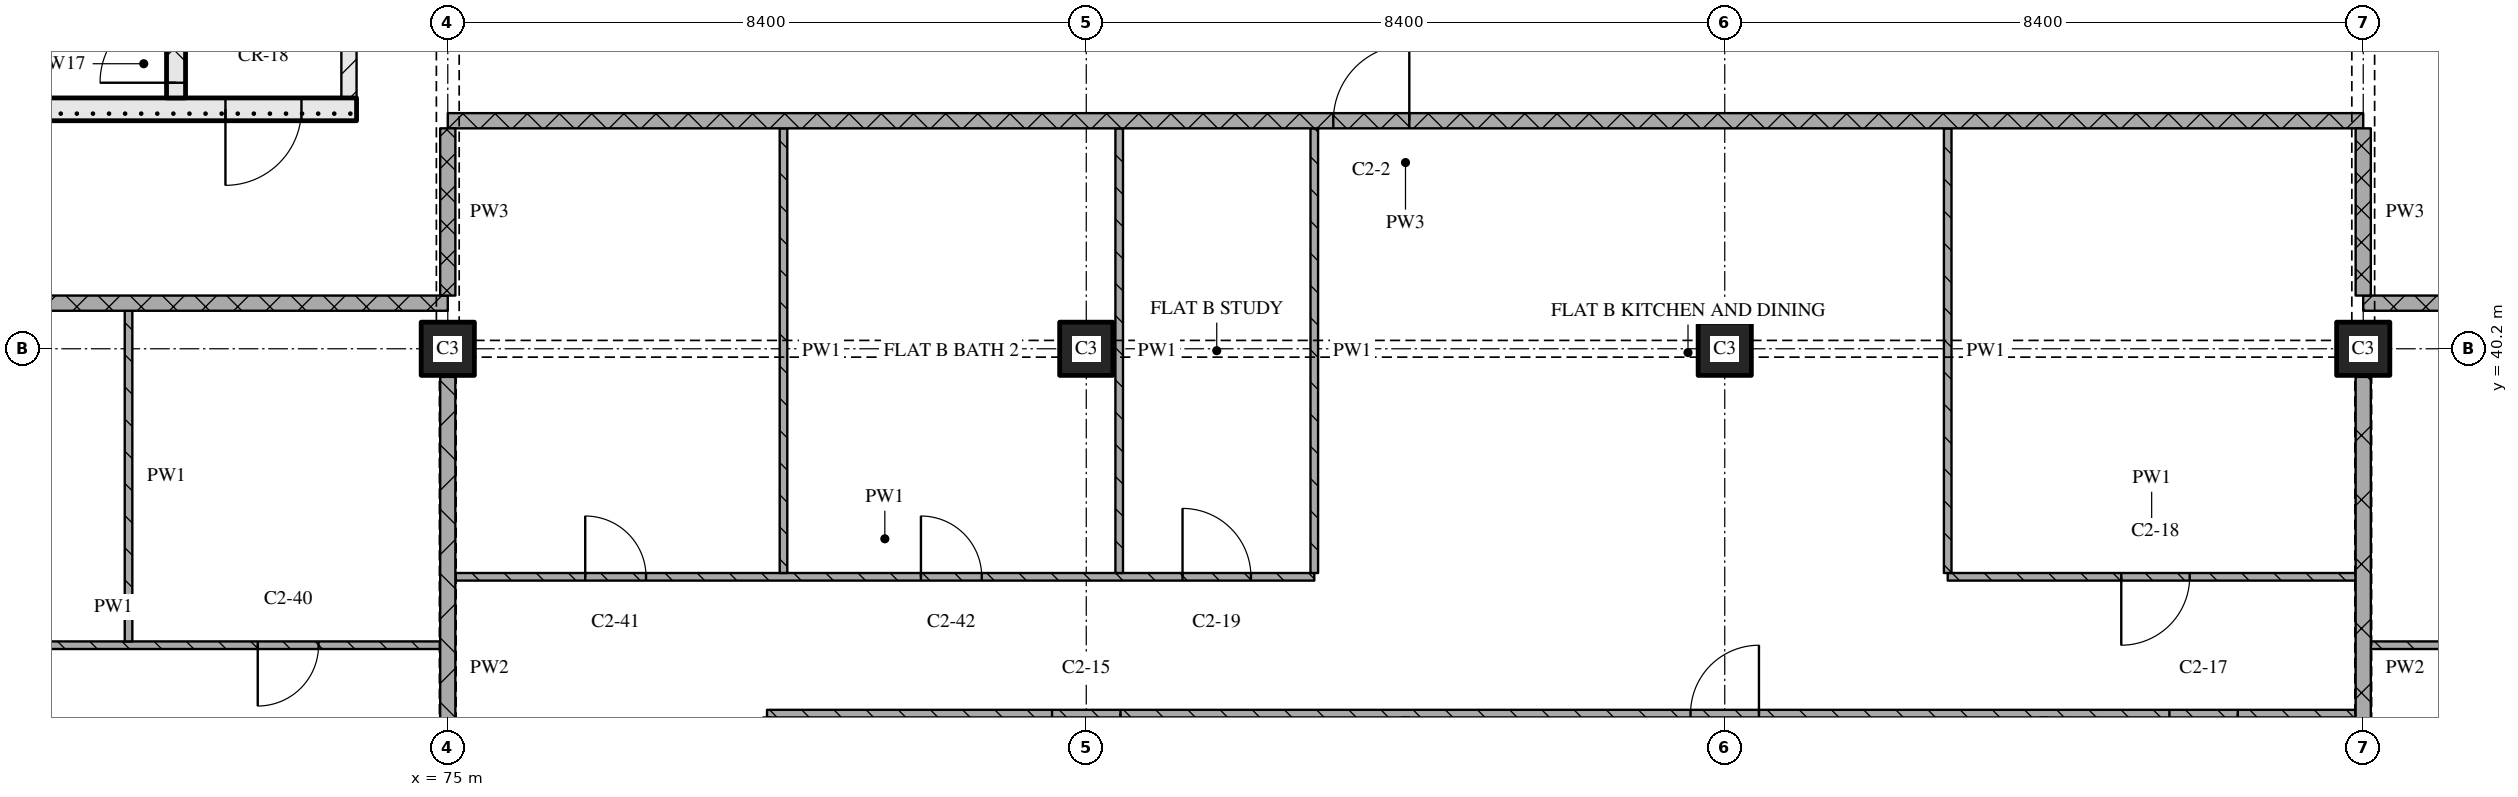
"""IFC4 building model, lengths in metres.
Left out: names, types, materials, properties, quantities, classifications, styles, units other than length and angle.
Written with IfcOpenShell. Run it as: python <this file> out.ifc"""

import sys

from ifc_helpers import new_model, si_unit, direction, frame, frame_2d, origin, origin_2d, place, context, subcontext, project, spatial, rectangle, extrude, element, fill, save


model = new_model("IFC4")
c1 = context("Model", 3, precision=1e-05, world=origin(), true_north=direction((0.0, 1.0)))
c2 = subcontext(c1, "Body", "Model", "MODEL_VIEW")
j1 = project(units=[si_unit("LENGTHUNIT", "METRE"), si_unit("PLANEANGLEUNIT", "RADIAN")], contexts=[c1])
p1 = place(None, origin())
s1 = spatial("IfcSite", under=j1, at=p1, CompositionType="ELEMENT")
p2 = place(p1, origin())
s2 = spatial("IfcBuilding", under=s1, at=p2, CompositionType="ELEMENT")
p3 = place(p2, frame((0.0, 0.0, 161.85)))
s3 = spatial("IfcBuildingStorey", under=s2, at=p3, CompositionType="ELEMENT", Elevation=161.85)
for number, where, z_axis, x_axis in (
    (1, (75.0, 40.2, 0.0), (0.0, 0.0, 1.0), (1.0, 0.0, 0.0)),
    (2, (83.4, 40.2, 0.0), (0.0, 0.0, 1.0), (1.0, 0.0, 0.0)),
    (3, (91.8, 40.2, 0.0), (0.0, 0.0, 1.0), (1.0, 0.0, 0.0)),
    (4, (100.2, 40.2, 0.0), (0.0, 0.0, 1.0), (1.0, 0.0, 0.0)),
):
    element("IfcColumn", number, at=place(p3, frame(where, z_axis=z_axis, x_axis=x_axis)), inside=s3, PredefinedType="COLUMN", context=c2, shape_type="SweptSolid", body=[
        extrude(rectangle(XDim=0.7, YDim=0.7, at=origin_2d()), origin(), (0.0, 0.0, 1.0), 3.6),
    ])
p4 = place(p3, frame((68.2, 43.35, 0.0), z_axis=(0.0, 0.0, 1.0), x_axis=(1.0, 0.0, 0.0)))
e5 = element("IfcWall", 5, at=p4, inside=s3, PredefinedType="SOLIDWALL", context=c2, shape_type="SweptSolid", body=[
    extrude(rectangle(XDim=5.6, YDim=0.3, at=frame_2d((2.8, 0.0))), origin(), (0.0, 0.0, 1.0), 3.32),
])
p5 = place(p4, frame((3.875, 0.0, 0.0)))
e6 = element("IfcOpeningElement", 6, at=p5, cuts=e5, PredefinedType="OPENING", context=c2, shape_type="SweptSolid", body=[
    extrude(rectangle(XDim=1.0, YDim=2.1, at=frame_2d((0.5, 1.05))), frame((0.0, 0.16, 0.0), z_axis=(0.0, -1.0, 0.0), x_axis=(1.0, 0.0, 0.0)), (0.0, 0.0, 1.0), 0.32),
])
p6 = place(p3, frame((71.425, 43.5, 0.0), z_axis=(0.0, 0.0, 1.0), x_axis=(0.0, 1.0, 0.0)))
e7 = element("IfcWall", 7, at=p6, inside=s3, PredefinedType="SOLIDWALL", context=c2, shape_type="SweptSolid", body=[
    extrude(rectangle(XDim=6.9, YDim=0.25, at=frame_2d((3.45, 0.0))), origin(), (0.0, 0.0, 1.0), 3.32),
])
p7 = place(p6, frame((0.2, 0.0, 0.0)))
e8 = element("IfcOpeningElement", 8, at=p7, cuts=e7, PredefinedType="OPENING", context=c2, shape_type="SweptSolid", body=[
    extrude(rectangle(XDim=1.0, YDim=2.1, at=frame_2d((0.5, 1.05))), frame((0.0, 0.135, 0.0), z_axis=(0.0, -1.0, 0.0), x_axis=(1.0, 0.0, 0.0)), (0.0, 0.0, 1.0), 0.27),
])
p8 = place(p3, frame((73.7, 43.5, 0.0), z_axis=(0.0, 0.0, 1.0), x_axis=(0.0, 1.0, 0.0)))
e9 = element("IfcWall", 9, at=p8, inside=s3, PredefinedType="PARTITIONING", context=c2, shape_type="SweptSolid", body=[
    extrude(rectangle(XDim=6.9, YDim=0.2, at=frame_2d((3.45, 0.0))), origin(), (0.0, 0.0, 1.0), 3.32),
])
p9 = place(p8, frame((1.0, 0.0, 0.0)))
e10 = element("IfcOpeningElement", 10, at=p9, cuts=e9, PredefinedType="OPENING", context=c2, shape_type="SweptSolid", body=[
    extrude(rectangle(XDim=1.0, YDim=2.1, at=frame_2d((0.5, 1.05))), frame((0.0, 0.11, 0.0), z_axis=(0.0, -1.0, 0.0), x_axis=(1.0, 0.0, 0.0)), (0.0, 0.0, 1.0), 0.22),
])
p10 = place(p3, frame((100.1, 35.4, 0.0), z_axis=(0.0, 0.0, 1.0), x_axis=(-1.0, 0.0, 0.0)))
e11 = element("IfcWall", 11, at=p10, inside=s3, PredefinedType="PARTITIONING", context=c2, shape_type="SweptSolid", body=[
    extrude(rectangle(XDim=20.9, YDim=0.1, at=frame_2d((10.45, 0.0))), origin(), (0.0, 0.0, 1.0), 3.32),
])
p11 = place(p10, frame((1.55, 0.0, 0.0)))
e12 = element("IfcOpeningElement", 12, at=p11, cuts=e11, PredefinedType="OPENING", context=c2, shape_type="SweptSolid", body=[
    extrude(rectangle(XDim=0.9, YDim=2.1, at=frame_2d((0.45, 1.05))), frame((0.0, 0.06, 0.0), z_axis=(0.0, -1.0, 0.0), x_axis=(1.0, 0.0, 0.0)), (0.0, 0.0, 1.0), 0.12),
])
p12 = place(p10, frame((7.85, 0.0, 0.0)))
e13 = element("IfcOpeningElement", 13, at=p12, cuts=e11, PredefinedType="OPENING", context=c2, shape_type="SweptSolid", body=[
    extrude(rectangle(XDim=0.9, YDim=2.1, at=frame_2d((0.45, 1.05))), frame((0.0, 0.06, 0.0), z_axis=(0.0, -1.0, 0.0), x_axis=(1.0, 0.0, 0.0)), (0.0, 0.0, 1.0), 0.12),
])
p13 = place(p10, frame((16.25, 0.0, 0.0)))
e14 = element("IfcOpeningElement", 14, at=p13, cuts=e11, PredefinedType="OPENING", context=c2, shape_type="SweptSolid", body=[
    extrude(rectangle(XDim=0.9, YDim=2.1, at=frame_2d((0.45, 1.05))), frame((0.0, 0.06, 0.0), z_axis=(0.0, -1.0, 0.0), x_axis=(1.0, 0.0, 0.0)), (0.0, 0.0, 1.0), 0.12),
])
p14 = place(p3, frame((66.3, 36.3, 0.0), z_axis=(0.0, 0.0, 1.0), x_axis=(1.0, 0.0, 0.0)))
e15 = element("IfcWall", 15, at=p14, inside=s3, PredefinedType="PARTITIONING", context=c2, shape_type="SweptSolid", body=[
    extrude(rectangle(XDim=8.6, YDim=0.1, at=frame_2d((4.3, 0.0))), origin(), (0.0, 0.0, 1.0), 3.32),
])
p15 = place(p14, frame((6.2, 0.0, 0.0)))
e16 = element("IfcOpeningElement", 16, at=p15, cuts=e15, PredefinedType="OPENING", context=c2, shape_type="SweptSolid", body=[
    extrude(rectangle(XDim=0.8, YDim=2.1, at=frame_2d((0.4, 1.05))), frame((0.0, 0.06, 0.0), z_axis=(0.0, -1.0, 0.0), x_axis=(1.0, 0.0, 0.0)), (0.0, 0.0, 1.0), 0.12),
])
p16 = place(p3, frame((100.3, 36.3, 0.0), z_axis=(0.0, 0.0, 1.0), x_axis=(1.0, 0.0, 0.0)))
e17 = element("IfcWall", 17, at=p16, inside=s3, PredefinedType="PARTITIONING", context=c2, shape_type="SweptSolid", body=[
    extrude(rectangle(XDim=12.2, YDim=0.1, at=frame_2d((6.1, 0.0))), origin(), (0.0, 0.0, 1.0), 3.32),
])
p17 = place(p16, frame((1.75, 0.0, 0.0)))
e18 = element("IfcOpeningElement", 18, at=p17, cuts=e17, PredefinedType="OPENING", context=c2, shape_type="SweptSolid", body=[
    extrude(rectangle(XDim=0.8, YDim=2.1, at=frame_2d((0.4, 1.05))), frame((0.0, 0.06, 0.0), z_axis=(0.0, -1.0, 0.0), x_axis=(1.0, 0.0, 0.0)), (0.0, 0.0, 1.0), 0.12),
])
p18 = place(p16, frame((6.25, 0.0, 0.0)))
e19 = element("IfcOpeningElement", 19, at=p18, cuts=e17, PredefinedType="OPENING", context=c2, shape_type="SweptSolid", body=[
    extrude(rectangle(XDim=0.8, YDim=2.1, at=frame_2d((0.4, 1.05))), frame((0.0, 0.06, 0.0), z_axis=(0.0, -1.0, 0.0), x_axis=(1.0, 0.0, 0.0)), (0.0, 0.0, 1.0), 0.12),
])
p19 = place(p3, frame((75.1, 37.2, 0.0), z_axis=(0.0, 0.0, 1.0), x_axis=(1.0, 0.0, 0.0)))
e20 = element("IfcWall", 20, at=p19, inside=s3, PredefinedType="PARTITIONING", context=c2, shape_type="SweptSolid", body=[
    extrude(rectangle(XDim=11.3, YDim=0.1, at=frame_2d((5.65, 0.0))), origin(), (0.0, 0.0, 1.0), 3.32),
])
p20 = place(p19, frame((1.708, 0.0, 0.0)))
e21 = element("IfcOpeningElement", 21, at=p20, cuts=e20, PredefinedType="OPENING", context=c2, shape_type="SweptSolid", body=[
    extrude(rectangle(XDim=0.8, YDim=2.1, at=frame_2d((0.4, 1.05))), frame((0.0, 0.06, 0.0), z_axis=(0.0, -1.0, 0.0), x_axis=(1.0, 0.0, 0.0)), (0.0, 0.0, 1.0), 0.12),
])
p21 = place(p19, frame((6.125, 0.0, 0.0)))
e22 = element("IfcOpeningElement", 22, at=p21, cuts=e20, PredefinedType="OPENING", context=c2, shape_type="SweptSolid", body=[
    extrude(rectangle(XDim=0.8, YDim=2.1, at=frame_2d((0.4, 1.05))), frame((0.0, 0.06, 0.0), z_axis=(0.0, -1.0, 0.0), x_axis=(1.0, 0.0, 0.0)), (0.0, 0.0, 1.0), 0.12),
])
p22 = place(p19, frame((9.567, 0.0, 0.0)))
e23 = element("IfcOpeningElement", 23, at=p22, cuts=e20, PredefinedType="OPENING", context=c2, shape_type="SweptSolid", body=[
    extrude(rectangle(XDim=0.9, YDim=2.1, at=frame_2d((0.45, 1.05))), frame((0.0, 0.06, 0.0), z_axis=(0.0, -1.0, 0.0), x_axis=(1.0, 0.0, 0.0)), (0.0, 0.0, 1.0), 0.12),
])
p23 = place(p3, frame((94.733, 37.2, 0.0), z_axis=(0.0, 0.0, 1.0), x_axis=(1.0, 0.0, 0.0)))
e24 = element("IfcWall", 24, at=p23, inside=s3, PredefinedType="PARTITIONING", context=c2, shape_type="SweptSolid", body=[
    extrude(rectangle(XDim=5.367, YDim=0.1, at=frame_2d((2.683, 0.0))), origin(), (0.0, 0.0, 1.0), 3.32),
])
p24 = place(p23, frame((2.283, 0.0, 0.0)))
e25 = element("IfcOpeningElement", 25, at=p24, cuts=e24, PredefinedType="OPENING", context=c2, shape_type="SweptSolid", body=[
    extrude(rectangle(XDim=0.9, YDim=2.1, at=frame_2d((0.45, 1.05))), frame((0.0, 0.06, 0.0), z_axis=(0.0, -1.0, 0.0), x_axis=(1.0, 0.0, 0.0)), (0.0, 0.0, 1.0), 0.12),
])
p25 = place(p3, frame((75.0, 40.8, 0.0), z_axis=(0.0, 0.0, 1.0), x_axis=(-1.0, 0.0, 0.0)))
e26 = element("IfcWall", 26, at=p25, inside=s3, PredefinedType="PARTITIONING", context=c2, shape_type="SweptSolid", body=[
    extrude(rectangle(XDim=24.28, YDim=0.2, at=frame_2d((12.14, 0.0))), origin(), (0.0, 0.0, 1.0), 3.32),
])
p26 = place(p25, frame((8.95, 0.0, 0.0)))
e27 = element("IfcOpeningElement", 27, at=p26, cuts=e26, PredefinedType="OPENING", context=c2, shape_type="SweptSolid", body=[
    extrude(rectangle(XDim=1.0, YDim=2.1, at=frame_2d((0.5, 1.05))), frame((0.0, 0.11, 0.0), z_axis=(0.0, -1.0, 0.0), x_axis=(1.0, 0.0, 0.0)), (0.0, 0.0, 1.0), 0.22),
])
p27 = place(p3, frame((124.48, 40.8, 0.0), z_axis=(0.0, 0.0, 1.0), x_axis=(-1.0, 0.0, 0.0)))
e28 = element("IfcWall", 28, at=p27, inside=s3, PredefinedType="PARTITIONING", context=c2, shape_type="SweptSolid", body=[
    extrude(rectangle(XDim=24.28, YDim=0.2, at=frame_2d((12.14, 0.0))), origin(), (0.0, 0.0, 1.0), 3.32),
])
p28 = place(p27, frame((10.73, 0.0, 0.0)))
e29 = element("IfcOpeningElement", 29, at=p28, cuts=e28, PredefinedType="OPENING", context=c2, shape_type="SweptSolid", body=[
    extrude(rectangle(XDim=1.0, YDim=2.1, at=frame_2d((0.5, 1.05))), frame((0.0, 0.11, 0.0), z_axis=(0.0, -1.0, 0.0), x_axis=(1.0, 0.0, 0.0)), (0.0, 0.0, 1.0), 0.22),
])
p29 = place(p3, frame((100.2, 43.2, 0.0), z_axis=(0.0, 0.0, 1.0), x_axis=(-1.0, 0.0, 0.0)))
e30 = element("IfcWall", 30, at=p29, inside=s3, PredefinedType="PARTITIONING", context=c2, shape_type="SweptSolid", body=[
    extrude(rectangle(XDim=25.2, YDim=0.2, at=frame_2d((12.6, 0.0))), origin(), (0.0, 0.0, 1.0), 3.32),
])
p30 = place(p29, frame((12.55, 0.0, 0.0)))
e31 = element("IfcOpeningElement", 31, at=p30, cuts=e30, PredefinedType="OPENING", context=c2, shape_type="SweptSolid", body=[
    extrude(rectangle(XDim=1.0, YDim=2.1, at=frame_2d((0.5, 1.05))), frame((0.0, 0.11, 0.0), z_axis=(0.0, -1.0, 0.0), x_axis=(1.0, 0.0, 0.0)), (0.0, 0.0, 1.0), 0.22),
])
p31 = place(p3, frame((70.8, 40.7, 0.0), z_axis=(0.0, 0.0, 1.0), x_axis=(0.0, -1.0, 0.0)))
e32 = element("IfcWall", 32, at=p31, inside=s3, PredefinedType="PARTITIONING", context=c2, shape_type="SweptSolid", body=[
    extrude(rectangle(XDim=4.35, YDim=0.1, at=frame_2d((2.175, 0.0))), origin(), (0.0, 0.0, 1.0), 3.32),
])
p32 = place(p3, frame((75.0, 43.1, 0.0), z_axis=(0.0, 0.0, 1.0), x_axis=(0.0, -1.0, 0.0)))
e33 = element("IfcWall", 33, at=p32, inside=s3, PredefinedType="PARTITIONING", context=c2, shape_type="SweptSolid", body=[
    extrude(rectangle(XDim=2.2, YDim=0.2, at=frame_2d((1.1, 0.0))), origin(), (0.0, 0.0, 1.0), 2.43),
])
p33 = place(p3, frame((75.0, 39.83, 0.0), z_axis=(0.0, 0.0, 1.0), x_axis=(0.0, -1.0, 0.0)))
e34 = element("IfcWall", 34, at=p33, inside=s3, PredefinedType="PARTITIONING", context=c2, shape_type="SweptSolid", body=[
    extrude(rectangle(XDim=7.66, YDim=0.2, at=frame_2d((3.83, 0.0))), origin(), (0.0, 0.0, 1.0), 2.72),
])
for number, where, z_axis, x_axis in (
    (35, (79.417, 43.1, 0.0), (0.0, 0.0, 1.0), (0.0, -1.0, 0.0)),
    (36, (83.833, 43.1, 0.0), (0.0, 0.0, 1.0), (0.0, -1.0, 0.0)),
    (37, (86.4, 43.1, 0.0), (0.0, 0.0, 1.0), (0.0, -1.0, 0.0)),
    (38, (94.733, 43.1, 0.0), (0.0, 0.0, 1.0), (0.0, -1.0, 0.0)),
):
    element("IfcWall", number, at=place(p3, frame(where, z_axis=z_axis, x_axis=x_axis)), inside=s3, PredefinedType="PARTITIONING", context=c2, shape_type="SweptSolid", body=[
        extrude(rectangle(XDim=5.85, YDim=0.1, at=frame_2d((2.925, 0.0))), origin(), (0.0, 0.0, 1.0), 3.32),
    ])
p34 = place(p3, frame((100.2, 43.1, 0.0), z_axis=(0.0, 0.0, 1.0), x_axis=(0.0, -1.0, 0.0)))
e39 = element("IfcWall", 39, at=p34, inside=s3, PredefinedType="PARTITIONING", context=c2, shape_type="SweptSolid", body=[
    extrude(rectangle(XDim=2.2, YDim=0.2, at=frame_2d((1.1, 0.0))), origin(), (0.0, 0.0, 1.0), 2.43),
])
p35 = place(p3, frame((100.2, 39.83, 0.0), z_axis=(0.0, 0.0, 1.0), x_axis=(0.0, -1.0, 0.0)))
e40 = element("IfcWall", 40, at=p35, inside=s3, PredefinedType="PARTITIONING", context=c2, shape_type="SweptSolid", body=[
    extrude(rectangle(XDim=7.66, YDim=0.2, at=frame_2d((3.83, 0.0))), origin(), (0.0, 0.0, 1.0), 2.72),
])
p36 = place(p5, origin())
e41 = element("IfcDoor", 41, at=p36, inside=s3, OperationType="SINGLE_SWING_RIGHT", PredefinedType="DOOR", context=c2, shape_type="SweptSolid", body=[
    extrude(rectangle(XDim=1.0, YDim=2.1, at=frame_2d((0.5, 1.05))), frame((0.0, 0.025, 0.0), z_axis=(0.0, -1.0, 0.0), x_axis=(1.0, 0.0, 0.0)), (0.0, 0.0, 1.0), 0.05),
])
fill(e6, e41)
p37 = place(p7, origin())
e42 = element("IfcDoor", 42, at=p37, inside=s3, OperationType="SINGLE_SWING_LEFT", PredefinedType="DOOR", context=c2, shape_type="SweptSolid", body=[
    extrude(rectangle(XDim=1.0, YDim=2.1, at=frame_2d((0.5, 1.05))), frame((0.0, 0.025, 0.0), z_axis=(0.0, -1.0, 0.0), x_axis=(1.0, 0.0, 0.0)), (0.0, 0.0, 1.0), 0.05),
])
fill(e8, e42)
p38 = place(p11, origin())
e43 = element("IfcDoor", 43, at=p38, inside=s3, OperationType="SINGLE_SWING_LEFT", PredefinedType="DOOR", context=c2, shape_type="SweptSolid", body=[
    extrude(rectangle(XDim=0.9, YDim=2.1, at=frame_2d((0.45, 1.05))), frame((0.0, 0.025, 0.0), z_axis=(0.0, -1.0, 0.0), x_axis=(1.0, 0.0, 0.0)), (0.0, 0.0, 1.0), 0.05),
])
fill(e12, e43)
p39 = place(p12, origin())
e44 = element("IfcDoor", 44, at=p39, inside=s3, OperationType="SINGLE_SWING_RIGHT", PredefinedType="DOOR", context=c2, shape_type="SweptSolid", body=[
    extrude(rectangle(XDim=0.9, YDim=2.1, at=frame_2d((0.45, 1.05))), frame((0.0, 0.025, 0.0), z_axis=(0.0, -1.0, 0.0), x_axis=(1.0, 0.0, 0.0)), (0.0, 0.0, 1.0), 0.05),
])
fill(e13, e44)
p40 = place(p13, origin())
e45 = element("IfcDoor", 45, at=p40, inside=s3, OperationType="SINGLE_SWING_LEFT", PredefinedType="DOOR", context=c2, shape_type="SweptSolid", body=[
    extrude(rectangle(XDim=0.9, YDim=2.1, at=frame_2d((0.45, 1.05))), frame((0.0, 0.025, 0.0), z_axis=(0.0, -1.0, 0.0), x_axis=(1.0, 0.0, 0.0)), (0.0, 0.0, 1.0), 0.05),
])
fill(e14, e45)
p41 = place(p15, origin())
e46 = element("IfcDoor", 46, at=p41, inside=s3, OperationType="SINGLE_SWING_RIGHT", PredefinedType="DOOR", context=c2, shape_type="SweptSolid", body=[
    extrude(rectangle(XDim=0.8, YDim=2.1, at=frame_2d((0.4, 1.05))), frame((0.0, 0.025, 0.0), z_axis=(0.0, -1.0, 0.0), x_axis=(1.0, 0.0, 0.0)), (0.0, 0.0, 1.0), 0.05),
])
fill(e16, e46)
p42 = place(p20, origin())
e47 = element("IfcDoor", 47, at=p42, inside=s3, OperationType="SINGLE_SWING_LEFT", PredefinedType="DOOR", context=c2, shape_type="SweptSolid", body=[
    extrude(rectangle(XDim=0.8, YDim=2.1, at=frame_2d((0.4, 1.05))), frame((0.0, 0.025, 0.0), z_axis=(0.0, -1.0, 0.0), x_axis=(1.0, 0.0, 0.0)), (0.0, 0.0, 1.0), 0.05),
])
fill(e21, e47)
p43 = place(p21, origin())
e48 = element("IfcDoor", 48, at=p43, inside=s3, OperationType="SINGLE_SWING_LEFT", PredefinedType="DOOR", context=c2, shape_type="SweptSolid", body=[
    extrude(rectangle(XDim=0.8, YDim=2.1, at=frame_2d((0.4, 1.05))), frame((0.0, 0.025, 0.0), z_axis=(0.0, -1.0, 0.0), x_axis=(1.0, 0.0, 0.0)), (0.0, 0.0, 1.0), 0.05),
])
fill(e22, e48)
p44 = place(p22, origin())
e49 = element("IfcDoor", 49, at=p44, inside=s3, OperationType="SINGLE_SWING_LEFT", PredefinedType="DOOR", context=c2, shape_type="SweptSolid", body=[
    extrude(rectangle(XDim=0.9, YDim=2.1, at=frame_2d((0.45, 1.05))), frame((0.0, 0.025, 0.0), z_axis=(0.0, -1.0, 0.0), x_axis=(1.0, 0.0, 0.0)), (0.0, 0.0, 1.0), 0.05),
])
fill(e23, e49)
p45 = place(p24, origin())
e50 = element("IfcDoor", 50, at=p45, inside=s3, OperationType="SINGLE_SWING_RIGHT", PredefinedType="DOOR", context=c2, shape_type="SweptSolid", body=[
    extrude(rectangle(XDim=0.9, YDim=2.1, at=frame_2d((0.45, 1.05))), frame((0.0, 0.025, 0.0), z_axis=(0.0, -1.0, 0.0), x_axis=(1.0, 0.0, 0.0)), (0.0, 0.0, 1.0), 0.05),
])
fill(e25, e50)
p46 = place(p30, origin())
e51 = element("IfcDoor", 51, at=p46, inside=s3, OperationType="SINGLE_SWING_RIGHT", PredefinedType="DOOR", context=c2, shape_type="SweptSolid", body=[
    extrude(rectangle(XDim=1.0, YDim=2.1, at=frame_2d((0.5, 1.05))), frame((0.0, 0.025, 0.0), z_axis=(0.0, -1.0, 0.0), x_axis=(1.0, 0.0, 0.0)), (0.0, 0.0, 1.0), 0.05),
])
fill(e31, e51)
save(model, sys.argv[1])
